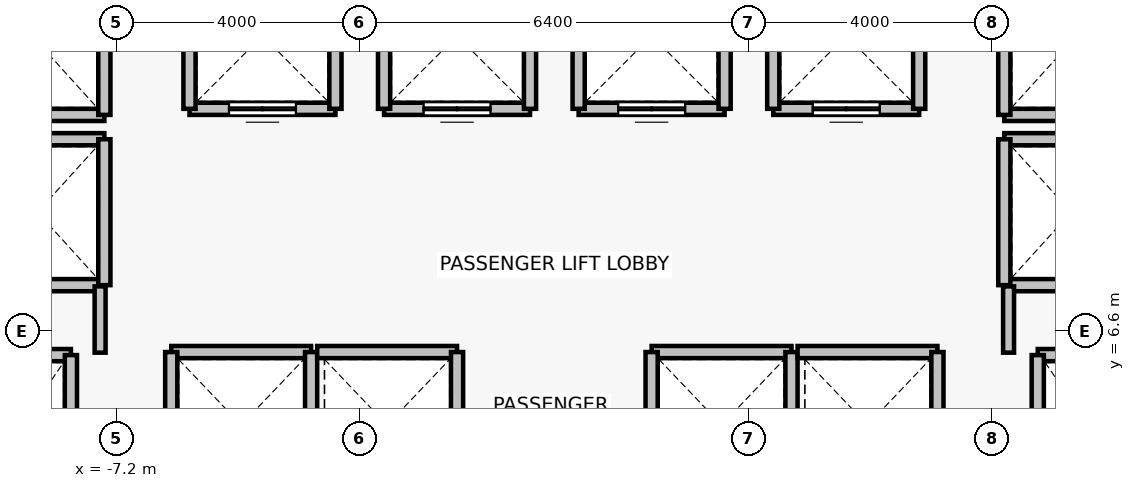
"""IFC4 building model, lengths in metres.
Left out: names, types, materials, properties, quantities, classifications, styles, units other than length and angle.
Written with IfcOpenShell. Run it as: python <this file> out.ifc"""

import sys

from ifc_helpers import new_model, si_unit, direction, frame, frame_2d, origin, place, context, subcontext, project, spatial, rectangle, extrude, source, transform, mapped, element, fill, save


model = new_model("IFC4")
c1 = context("Model", 3, precision=1e-05, world=origin(), true_north=direction((0.0, 1.0)))
c2 = subcontext(c1, "Body", "Model", "MODEL_VIEW")
j1 = project(units=[si_unit("LENGTHUNIT", "METRE"), si_unit("PLANEANGLEUNIT", "RADIAN")], contexts=[c1])
p1 = place(None, origin())
s1 = spatial("IfcSite", under=j1, at=p1, CompositionType="ELEMENT")
p2 = place(p1, origin())
s2 = spatial("IfcBuilding", under=s1, at=p2, CompositionType="ELEMENT")
p3 = place(p2, frame((0.0, 0.0, 60.4)))
s3 = spatial("IfcBuildingStorey", under=s2, at=p3, CompositionType="ELEMENT", Elevation=60.4)
p4 = place(p3, frame((-9.95, 6.2, 0.0), z_axis=(0.0, 0.0, 1.0), x_axis=(1.0, 0.0, 0.0)))
e1 = element("IfcWall", 1, at=p4, inside=s3, PredefinedType="SOLIDWALL", context=c2, shape_type="SweptSolid", body=[
    extrude(rectangle(XDim=2.0, YDim=0.2, at=frame_2d((1.0, 0.0))), origin(), (0.0, 0.0, 1.0), 3.075),
])
p5 = place(p3, frame((-7.95, 6.2, 0.0), z_axis=(0.0, 0.0, 1.0), x_axis=(0.0, -1.0, 0.0)))
e2 = element("IfcWall", 2, at=p5, inside=s3, PredefinedType="SOLIDWALL", context=c2, shape_type="SweptSolid", body=[
    extrude(rectangle(XDim=2.8, YDim=0.2, at=frame_2d((1.4, 0.0))), origin(), (0.0, 0.0, 1.0), 3.075),
])
p6 = place(p3, frame((7.95, 6.2, 0.0), z_axis=(0.0, 0.0, 1.0), x_axis=(1.0, 0.0, 0.0)))
e3 = element("IfcWall", 3, at=p6, inside=s3, PredefinedType="SOLIDWALL", context=c2, shape_type="SweptSolid", body=[
    extrude(rectangle(XDim=2.0, YDim=0.2, at=frame_2d((1.0, 0.0))), origin(), (0.0, 0.0, 1.0), 3.075),
])
p7 = place(p3, frame((7.95, 3.4, 0.0), z_axis=(0.0, 0.0, 1.0), x_axis=(0.0, 1.0, 0.0)))
e4 = element("IfcWall", 4, at=p7, inside=s3, PredefinedType="SOLIDWALL", context=c2, shape_type="SweptSolid", body=[
    extrude(rectangle(XDim=2.8, YDim=0.2, at=frame_2d((1.4, 0.0))), origin(), (0.0, 0.0, 1.0), 3.075),
])
p8 = place(p3, frame((-3.6, 10.25, 0.0), z_axis=(0.0, 0.0, 1.0), x_axis=(-1.0, 0.0, 0.0)))
e5 = element("IfcWall", 5, at=p8, inside=s3, PredefinedType="SOLIDWALL", context=c2, shape_type="SweptSolid", body=[
    extrude(rectangle(XDim=2.4, YDim=0.2, at=frame_2d((1.2, 0.0))), origin(), (0.0, 0.0, 1.0), 3.075),
])
p9 = place(p8, frame((0.65, 0.0, 0.0)))
e6 = element("IfcOpeningElement", 6, at=p9, cuts=e5, PredefinedType="OPENING", context=c2, shape_type="SweptSolid", body=[
    extrude(rectangle(XDim=1.1, YDim=2.2, at=frame_2d((0.55, 1.1))), frame((0.0, 0.11, 0.0), z_axis=(0.0, -1.0, 0.0), x_axis=(1.0, 0.0, 0.0)), (0.0, 0.0, 1.0), 0.22),
])
for number, where, z_axis, x_axis in (
    (7, (-6.0, 10.25, 0.0), (0.0, 0.0, 1.0), (0.0, 1.0, 0.0)),
    (8, (-3.6, 12.65, 0.0), (0.0, 0.0, 1.0), (0.0, -1.0, 0.0)),
):
    element("IfcWall", number, at=place(p3, frame(where, z_axis=z_axis, x_axis=x_axis)), inside=s3, PredefinedType="SOLIDWALL", context=c2, shape_type="SweptSolid", body=[
        extrude(rectangle(XDim=2.4, YDim=0.2, at=frame_2d((1.2, 0.0))), origin(), (0.0, 0.0, 1.0), 3.075),
    ])
p10 = place(p3, frame((-0.4, 10.25, 0.0), z_axis=(0.0, 0.0, 1.0), x_axis=(-1.0, 0.0, 0.0)))
e9 = element("IfcWall", 9, at=p10, inside=s3, PredefinedType="SOLIDWALL", context=c2, shape_type="SweptSolid", body=[
    extrude(rectangle(XDim=2.4, YDim=0.2, at=frame_2d((1.2, 0.0))), origin(), (0.0, 0.0, 1.0), 3.075),
])
p11 = place(p10, frame((0.65, 0.0, 0.0)))
e10 = element("IfcOpeningElement", 10, at=p11, cuts=e9, PredefinedType="OPENING", context=c2, shape_type="SweptSolid", body=[
    extrude(rectangle(XDim=1.1, YDim=2.2, at=frame_2d((0.55, 1.1))), frame((0.0, 0.11, 0.0), z_axis=(0.0, -1.0, 0.0), x_axis=(1.0, 0.0, 0.0)), (0.0, 0.0, 1.0), 0.22),
])
for number, where, z_axis, x_axis in (
    (11, (-2.8, 10.25, 0.0), (0.0, 0.0, 1.0), (0.0, 1.0, 0.0)),
    (12, (-0.4, 12.65, 0.0), (0.0, 0.0, 1.0), (0.0, -1.0, 0.0)),
):
    element("IfcWall", number, at=place(p3, frame(where, z_axis=z_axis, x_axis=x_axis)), inside=s3, PredefinedType="SOLIDWALL", context=c2, shape_type="SweptSolid", body=[
        extrude(rectangle(XDim=2.4, YDim=0.2, at=frame_2d((1.2, 0.0))), origin(), (0.0, 0.0, 1.0), 3.075),
    ])
p12 = place(p3, frame((2.8, 10.25, 0.0), z_axis=(0.0, 0.0, 1.0), x_axis=(-1.0, 0.0, 0.0)))
e13 = element("IfcWall", 13, at=p12, inside=s3, PredefinedType="SOLIDWALL", context=c2, shape_type="SweptSolid", body=[
    extrude(rectangle(XDim=2.4, YDim=0.2, at=frame_2d((1.2, 0.0))), origin(), (0.0, 0.0, 1.0), 3.075),
])
p13 = place(p12, frame((0.65, 0.0, 0.0)))
e14 = element("IfcOpeningElement", 14, at=p13, cuts=e13, PredefinedType="OPENING", context=c2, shape_type="SweptSolid", body=[
    extrude(rectangle(XDim=1.1, YDim=2.2, at=frame_2d((0.55, 1.1))), frame((0.0, 0.11, 0.0), z_axis=(0.0, -1.0, 0.0), x_axis=(1.0, 0.0, 0.0)), (0.0, 0.0, 1.0), 0.22),
])
for number, where, z_axis, x_axis in (
    (15, (0.4, 10.25, 0.0), (0.0, 0.0, 1.0), (0.0, 1.0, 0.0)),
    (16, (2.8, 12.65, 0.0), (0.0, 0.0, 1.0), (0.0, -1.0, 0.0)),
):
    element("IfcWall", number, at=place(p3, frame(where, z_axis=z_axis, x_axis=x_axis)), inside=s3, PredefinedType="SOLIDWALL", context=c2, shape_type="SweptSolid", body=[
        extrude(rectangle(XDim=2.4, YDim=0.2, at=frame_2d((1.2, 0.0))), origin(), (0.0, 0.0, 1.0), 3.075),
    ])
p14 = place(p3, frame((6.0, 10.25, 0.0), z_axis=(0.0, 0.0, 1.0), x_axis=(-1.0, 0.0, 0.0)))
e17 = element("IfcWall", 17, at=p14, inside=s3, PredefinedType="SOLIDWALL", context=c2, shape_type="SweptSolid", body=[
    extrude(rectangle(XDim=2.4, YDim=0.2, at=frame_2d((1.2, 0.0))), origin(), (0.0, 0.0, 1.0), 3.075),
])
p15 = place(p14, frame((0.65, 0.0, 0.0)))
e18 = element("IfcOpeningElement", 18, at=p15, cuts=e17, PredefinedType="OPENING", context=c2, shape_type="SweptSolid", body=[
    extrude(rectangle(XDim=1.1, YDim=2.2, at=frame_2d((0.55, 1.1))), frame((0.0, 0.11, 0.0), z_axis=(0.0, -1.0, 0.0), x_axis=(1.0, 0.0, 0.0)), (0.0, 0.0, 1.0), 0.22),
])
for number, where, z_axis, x_axis in (
    (19, (3.6, 10.25, 0.0), (0.0, 0.0, 1.0), (0.0, 1.0, 0.0)),
    (20, (6.0, 12.65, 0.0), (0.0, 0.0, 1.0), (0.0, -1.0, 0.0)),
):
    element("IfcWall", number, at=place(p3, frame(where, z_axis=z_axis, x_axis=x_axis)), inside=s3, PredefinedType="SOLIDWALL", context=c2, shape_type="SweptSolid", body=[
        extrude(rectangle(XDim=2.4, YDim=0.2, at=frame_2d((1.2, 0.0))), origin(), (0.0, 0.0, 1.0), 3.075),
    ])
p16 = place(p3, frame((-6.3, 6.25, 0.0), z_axis=(0.0, 0.0, 1.0), x_axis=(1.0, 0.0, 0.0)))
e21 = element("IfcWall", 21, at=p16, inside=s3, PredefinedType="SOLIDWALL", context=c2, shape_type="SweptSolid", body=[
    extrude(rectangle(XDim=2.3, YDim=0.2, at=frame_2d((1.15, 0.0))), origin(), (0.0, 0.0, 1.0), 3.075),
])
for number, where, z_axis, x_axis in (
    (22, (-6.3, 3.85, 0.0), (0.0, 0.0, 1.0), (0.0, 1.0, 0.0)),
    (23, (-4.0, 6.25, 0.0), (0.0, 0.0, 1.0), (0.0, -1.0, 0.0)),
):
    element("IfcWall", number, at=place(p3, frame(where, z_axis=z_axis, x_axis=x_axis)), inside=s3, PredefinedType="SOLIDWALL", context=c2, shape_type="SweptSolid", body=[
        extrude(rectangle(XDim=2.4, YDim=0.2, at=frame_2d((1.2, 0.0))), origin(), (0.0, 0.0, 1.0), 3.075),
    ])
p17 = place(p3, frame((-3.9, 6.25, 0.0), z_axis=(0.0, 0.0, 1.0), x_axis=(1.0, 0.0, 0.0)))
e24 = element("IfcWall", 24, at=p17, inside=s3, PredefinedType="SOLIDWALL", context=c2, shape_type="SweptSolid", body=[
    extrude(rectangle(XDim=2.3, YDim=0.2, at=frame_2d((1.15, 0.0))), origin(), (0.0, 0.0, 1.0), 3.075),
])
p18 = place(p3, frame((-1.6, 6.25, 0.0), z_axis=(0.0, 0.0, 1.0), x_axis=(0.0, -1.0, 0.0)))
e25 = element("IfcWall", 25, at=p18, inside=s3, PredefinedType="SOLIDWALL", context=c2, shape_type="SweptSolid", body=[
    extrude(rectangle(XDim=2.4, YDim=0.2, at=frame_2d((1.2, 0.0))), origin(), (0.0, 0.0, 1.0), 3.075),
])
p19 = place(p3, frame((1.6, 6.25, 0.0), z_axis=(0.0, 0.0, 1.0), x_axis=(1.0, 0.0, 0.0)))
e26 = element("IfcWall", 26, at=p19, inside=s3, PredefinedType="SOLIDWALL", context=c2, shape_type="SweptSolid", body=[
    extrude(rectangle(XDim=2.3, YDim=0.2, at=frame_2d((1.15, 0.0))), origin(), (0.0, 0.0, 1.0), 3.075),
])
for number, where, z_axis, x_axis in (
    (27, (1.6, 3.85, 0.0), (0.0, 0.0, 1.0), (0.0, 1.0, 0.0)),
    (28, (3.9, 6.25, 0.0), (0.0, 0.0, 1.0), (0.0, -1.0, 0.0)),
):
    element("IfcWall", number, at=place(p3, frame(where, z_axis=z_axis, x_axis=x_axis)), inside=s3, PredefinedType="SOLIDWALL", context=c2, shape_type="SweptSolid", body=[
        extrude(rectangle(XDim=2.4, YDim=0.2, at=frame_2d((1.2, 0.0))), origin(), (0.0, 0.0, 1.0), 3.075),
    ])
p20 = place(p3, frame((4.0, 6.25, 0.0), z_axis=(0.0, 0.0, 1.0), x_axis=(1.0, 0.0, 0.0)))
e29 = element("IfcWall", 29, at=p20, inside=s3, PredefinedType="SOLIDWALL", context=c2, shape_type="SweptSolid", body=[
    extrude(rectangle(XDim=2.3, YDim=0.2, at=frame_2d((1.15, 0.0))), origin(), (0.0, 0.0, 1.0), 3.075),
])
p21 = place(p3, frame((6.3, 6.25, 0.0), z_axis=(0.0, 0.0, 1.0), x_axis=(0.0, -1.0, 0.0)))
e30 = element("IfcWall", 30, at=p21, inside=s3, PredefinedType="SOLIDWALL", context=c2, shape_type="SweptSolid", body=[
    extrude(rectangle(XDim=2.4, YDim=0.2, at=frame_2d((1.2, 0.0))), origin(), (0.0, 0.0, 1.0), 3.075),
])
for number, where, z_axis, x_axis in (
    (31, (-7.4, 7.35, 0.0), (0.0, 0.0, 1.0), (-1.0, 0.0, 0.0)),
    (32, (-9.6, 9.75, 0.0), (0.0, 0.0, 1.0), (1.0, 0.0, 0.0)),
):
    element("IfcWall", number, at=place(p3, frame(where, z_axis=z_axis, x_axis=x_axis)), inside=s3, PredefinedType="SOLIDWALL", context=c2, shape_type="SweptSolid", body=[
        extrude(rectangle(XDim=2.2, YDim=0.2, at=frame_2d((1.1, 0.0))), origin(), (0.0, 0.0, 1.0), 2.465),
    ])
p22 = place(p3, frame((-7.4, 9.75, 0.0), z_axis=(0.0, 0.0, 1.0), x_axis=(0.0, -1.0, 0.0)))
e33 = element("IfcWall", 33, at=p22, inside=s3, PredefinedType="SOLIDWALL", context=c2, shape_type="SweptSolid", body=[
    extrude(rectangle(XDim=2.4, YDim=0.2, at=frame_2d((1.2, 0.0))), origin(), (0.0, 0.0, 1.0), 2.465),
])
p23 = place(p3, frame((-7.4, 10.15, 0.0), z_axis=(0.0, 0.0, 1.0), x_axis=(-1.0, 0.0, 0.0)))
e34 = element("IfcWall", 34, at=p23, inside=s3, PredefinedType="SOLIDWALL", context=c2, shape_type="SweptSolid", body=[
    extrude(rectangle(XDim=2.2, YDim=0.2, at=frame_2d((1.1, 0.0))), origin(), (0.0, 0.0, 1.0), 2.465),
])
p24 = place(p3, frame((-7.4, 12.55, 0.0), z_axis=(0.0, 0.0, 1.0), x_axis=(0.0, -1.0, 0.0)))
e35 = element("IfcWall", 35, at=p24, inside=s3, PredefinedType="SOLIDWALL", context=c2, shape_type="SweptSolid", body=[
    extrude(rectangle(XDim=2.4, YDim=0.2, at=frame_2d((1.2, 0.0))), origin(), (0.0, 0.0, 1.0), 2.465),
])
for number, where, z_axis, x_axis in (
    (36, (9.6, 7.35, 0.0), (0.0, 0.0, 1.0), (-1.0, 0.0, 0.0)),
    (37, (7.4, 9.75, 0.0), (0.0, 0.0, 1.0), (1.0, 0.0, 0.0)),
):
    element("IfcWall", number, at=place(p3, frame(where, z_axis=z_axis, x_axis=x_axis)), inside=s3, PredefinedType="SOLIDWALL", context=c2, shape_type="SweptSolid", body=[
        extrude(rectangle(XDim=2.2, YDim=0.2, at=frame_2d((1.1, 0.0))), origin(), (0.0, 0.0, 1.0), 2.465),
    ])
p25 = place(p3, frame((7.4, 7.35, 0.0), z_axis=(0.0, 0.0, 1.0), x_axis=(0.0, 1.0, 0.0)))
e38 = element("IfcWall", 38, at=p25, inside=s3, PredefinedType="SOLIDWALL", context=c2, shape_type="SweptSolid", body=[
    extrude(rectangle(XDim=2.4, YDim=0.2, at=frame_2d((1.2, 0.0))), origin(), (0.0, 0.0, 1.0), 2.465),
])
p26 = place(p3, frame((9.6, 10.15, 0.0), z_axis=(0.0, 0.0, 1.0), x_axis=(-1.0, 0.0, 0.0)))
e39 = element("IfcWall", 39, at=p26, inside=s3, PredefinedType="SOLIDWALL", context=c2, shape_type="SweptSolid", body=[
    extrude(rectangle(XDim=2.2, YDim=0.2, at=frame_2d((1.1, 0.0))), origin(), (0.0, 0.0, 1.0), 2.465),
])
p27 = place(p3, frame((7.4, 10.15, 0.0), z_axis=(0.0, 0.0, 1.0), x_axis=(0.0, 1.0, 0.0)))
e40 = element("IfcWall", 40, at=p27, inside=s3, PredefinedType="SOLIDWALL", context=c2, shape_type="SweptSolid", body=[
    extrude(rectangle(XDim=2.4, YDim=0.2, at=frame_2d((1.2, 0.0))), origin(), (0.0, 0.0, 1.0), 2.465),
])
for number, where, z_axis, x_axis in (
    (41, (-7.47, 7.33, 0.0), (0.0, 0.0, 1.0), (0.0, -1.0, 0.0)),
    (42, (7.47, 6.24, 0.0), (0.0, 0.0, 1.0), (0.0, 1.0, 0.0)),
):
    element("IfcWall", number, at=place(p3, frame(where, z_axis=z_axis, x_axis=x_axis)), inside=s3, PredefinedType="PARTITIONING", context=c2, shape_type="SweptSolid", body=[
        extrude(rectangle(XDim=1.09, YDim=0.18, at=frame_2d((0.545, 0.0))), origin(), (0.0, 0.0, 1.0), 2.465),
    ])
m1 = source(origin(), c2, "Body", "SweptSolid", [
    extrude(rectangle(XDim=1.1, YDim=2.2, at=frame_2d((0.55, 1.1))), frame((0.0, 0.025, 0.0), z_axis=(0.0, -1.0, 0.0), x_axis=(1.0, 0.0, 0.0)), (0.0, 0.0, 1.0), 0.05),
])
p28 = place(p9, origin())
e43 = element("IfcDoor", 43, at=p28, inside=s3, OperationType="DOUBLE_DOOR_SLIDING", PredefinedType="DOOR", context=c2, shape_type="MappedRepresentation", body=[
    mapped(m1, transform((0.0, 0.0, 0.0), x_axis=(1.0, 0.0, 0.0), y_axis=(0.0, 1.0, 0.0), z_axis=(0.0, 0.0, 1.0), scale=1.0)),
])
fill(e6, e43)
p29 = place(p11, origin())
e44 = element("IfcDoor", 44, at=p29, inside=s3, OperationType="DOUBLE_DOOR_SLIDING", PredefinedType="DOOR", context=c2, shape_type="MappedRepresentation", body=[
    mapped(m1, transform((0.0, 0.0, 0.0), x_axis=(1.0, 0.0, 0.0), y_axis=(0.0, 1.0, 0.0), z_axis=(0.0, 0.0, 1.0), scale=1.0)),
])
fill(e10, e44)
p30 = place(p13, origin())
e45 = element("IfcDoor", 45, at=p30, inside=s3, OperationType="DOUBLE_DOOR_SLIDING", PredefinedType="DOOR", context=c2, shape_type="MappedRepresentation", body=[
    mapped(m1, transform((0.0, 0.0, 0.0), x_axis=(1.0, 0.0, 0.0), y_axis=(0.0, 1.0, 0.0), z_axis=(0.0, 0.0, 1.0), scale=1.0)),
])
fill(e14, e45)
p31 = place(p15, origin())
e46 = element("IfcDoor", 46, at=p31, inside=s3, OperationType="DOUBLE_DOOR_SLIDING", PredefinedType="DOOR", context=c2, shape_type="MappedRepresentation", body=[
    mapped(m1, transform((0.0, 0.0, 0.0), x_axis=(1.0, 0.0, 0.0), y_axis=(0.0, 1.0, 0.0), z_axis=(0.0, 0.0, 1.0), scale=1.0)),
])
fill(e18, e46)
save(model, sys.argv[1])
